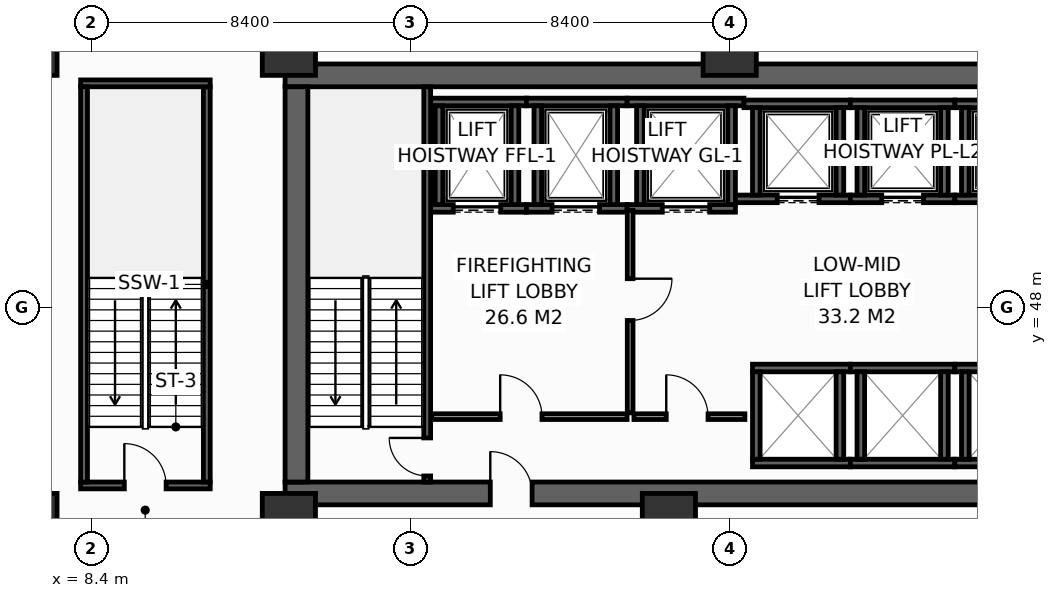
"""IFC4 building model, lengths in metres.
Left out: names, types, materials, properties, quantities, classifications, styles, units other than length and angle.
Written with IfcOpenShell. Run it as: python <this file> out.ifc"""

import sys

from ifc_helpers import new_model, si_unit, direction, frame, frame_2d, origin, origin_2d, place, context, subcontext, project, spatial, rectangle, hollow_rectangle, extrude, element, fill, save


model = new_model("IFC4")
c1 = context("Model", 3, precision=1e-05, world=origin(), true_north=direction((0.0, 1.0)))
c2 = subcontext(c1, "Body", "Model", "MODEL_VIEW")
j1 = project(units=[si_unit("LENGTHUNIT", "METRE"), si_unit("PLANEANGLEUNIT", "RADIAN")], contexts=[c1])
p1 = place(None, origin())
s1 = spatial("IfcSite", under=j1, at=p1, CompositionType="ELEMENT")
p2 = place(p1, origin())
s2 = spatial("IfcBuilding", under=s1, at=p2, CompositionType="ELEMENT")
p3 = place(p2, frame((0.0, 0.0, 16.8)))
s3 = spatial("IfcBuildingStorey", under=s2, at=p3, CompositionType="ELEMENT", Elevation=16.8)
p4 = place(p3, frame((13.5, 43.1, 0.0), z_axis=(0.0, 0.0, 1.0), x_axis=(1.0, 0.0, 0.0)))
e1 = element("IfcWall", 1, at=p4, inside=s3, PredefinedType="SHEAR", context=c2, shape_type="SweptSolid", body=[
    extrude(rectangle(XDim=32.9, YDim=0.6, at=frame_2d((16.45, 0.0))), origin(), (0.0, 0.0, 1.0), 5.1),
])
p5 = place(p4, frame((5.4, 0.0, 0.0)))
e2 = element("IfcOpeningElement", 2, at=p5, cuts=e1, PredefinedType="OPENING", context=c2, shape_type="SweptSolid", body=[
    extrude(rectangle(XDim=1.1, YDim=2.15, at=frame_2d((0.55, 1.075))), frame((0.0, 0.31, 0.0), z_axis=(0.0, -1.0, 0.0), x_axis=(1.0, 0.0, 0.0)), (0.0, 0.0, 1.0), 0.62),
])
p6 = place(p4, frame((25.6, 0.0, 0.0)))
e3 = element("IfcOpeningElement", 3, at=p6, cuts=e1, PredefinedType="OPENING", context=c2, shape_type="SweptSolid", body=[
    extrude(rectangle(XDim=1.1, YDim=2.15, at=frame_2d((0.55, 1.075))), frame((0.0, 0.31, 0.0), z_axis=(0.0, -1.0, 0.0), x_axis=(1.0, 0.0, 0.0)), (0.0, 0.0, 1.0), 0.62),
])
p7 = place(p3, frame((13.5, 54.1, 0.0), z_axis=(0.0, 0.0, 1.0), x_axis=(1.0, 0.0, 0.0)))
e4 = element("IfcWall", 4, at=p7, inside=s3, PredefinedType="SHEAR", context=c2, shape_type="SweptSolid", body=[
    extrude(rectangle(XDim=32.9, YDim=0.6, at=frame_2d((16.45, 0.0))), origin(), (0.0, 0.0, 1.0), 5.1),
])
p8 = place(p3, frame((13.8, 43.4, 0.0), z_axis=(0.0, 0.0, 1.0), x_axis=(0.0, 1.0, 0.0)))
e5 = element("IfcWall", 5, at=p8, inside=s3, PredefinedType="SHEAR", context=c2, shape_type="SweptSolid", body=[
    extrude(rectangle(XDim=10.4, YDim=0.6, at=frame_2d((5.2, 0.0))), origin(), (0.0, 0.0, 1.0), 5.1),
])
for number, where, z_axis, x_axis in (
    (6, (6.8, 54.8, 0.0), (0.0, 0.0, 1.0), (1.0, 0.0, 0.0)),
    (7, (13.6, 54.8, 0.0), (0.0, 0.0, 1.0), (1.0, 0.0, 0.0)),
    (8, (25.2, 54.8, 0.0), (0.0, 0.0, 1.0), (1.0, 0.0, 0.0)),
    (9, (6.8, 42.4, 0.0), (0.0, 0.0, 1.0), (1.0, 0.0, 0.0)),
    (10, (13.6, 42.4, 0.0), (0.0, 0.0, 1.0), (1.0, 0.0, 0.0)),
    (11, (23.6, 42.4, 0.0), (0.0, 0.0, 1.0), (1.0, 0.0, 0.0)),
):
    element("IfcColumn", number, at=place(p3, frame(where, z_axis=z_axis, x_axis=x_axis)), inside=s3, PredefinedType="COLUMN", context=c2, shape_type="SweptSolid", body=[
        extrude(hollow_rectangle(XDim=1.4, YDim=1.4, WallThickness=0.065, at=origin_2d()), origin(), (0.0, 0.0, 1.0), 5.4),
    ])
p9 = place(p3, frame((17.33, 50.6, 0.0), z_axis=(0.0, 0.0, 1.0), x_axis=(1.0, 0.0, 0.0)))
e12 = element("IfcWall", 12, at=p9, inside=s3, PredefinedType="SHEAR", context=c2, shape_type="SweptSolid", body=[
    extrude(rectangle(XDim=2.52, YDim=0.2, at=frame_2d((1.26, 0.0))), origin(), (0.0, 0.0, 1.0), 5.1),
])
p10 = place(p9, frame((0.595, 0.0, 0.0)))
e13 = element("IfcOpeningElement", 13, at=p10, cuts=e12, PredefinedType="OPENING", context=c2, shape_type="SweptSolid", body=[
    extrude(rectangle(XDim=1.25, YDim=2.3, at=frame_2d((0.625, 1.15))), frame((0.0, 0.11, 0.0), z_axis=(0.0, -1.0, 0.0), x_axis=(1.0, 0.0, 0.0)), (0.0, 0.0, 1.0), 0.22),
])
p11 = place(p3, frame((17.33, 53.4, 0.0), z_axis=(0.0, 0.0, 1.0), x_axis=(1.0, 0.0, 0.0)))
e14 = element("IfcWall", 14, at=p11, inside=s3, PredefinedType="SHEAR", context=c2, shape_type="SweptSolid", body=[
    extrude(rectangle(XDim=2.52, YDim=0.2, at=frame_2d((1.26, 0.0))), origin(), (0.0, 0.0, 1.0), 5.1),
])
for number, where, z_axis, x_axis in (
    (15, (17.55, 50.7, 0.0), (0.0, 0.0, 1.0), (0.0, 1.0, 0.0)),
    (16, (19.55, 50.7, 0.0), (0.0, 0.0, 1.0), (0.0, 1.0, 0.0)),
):
    element("IfcWall", number, at=place(p3, frame(where, z_axis=z_axis, x_axis=x_axis)), inside=s3, PredefinedType="SHEAR", context=c2, shape_type="SweptSolid", body=[
        extrude(rectangle(XDim=2.6, YDim=0.2, at=frame_2d((1.3, 0.0))), origin(), (0.0, 0.0, 1.0), 5.1),
    ])
p12 = place(p3, frame((19.85, 50.6, 0.0), z_axis=(0.0, 0.0, 1.0), x_axis=(1.0, 0.0, 0.0)))
e17 = element("IfcWall", 17, at=p12, inside=s3, PredefinedType="SHEAR", context=c2, shape_type="SweptSolid", body=[
    extrude(rectangle(XDim=2.65, YDim=0.2, at=frame_2d((1.325, 0.0))), origin(), (0.0, 0.0, 1.0), 5.1),
])
p13 = place(p12, frame((0.675, 0.0, 0.0)))
e18 = element("IfcOpeningElement", 18, at=p13, cuts=e17, PredefinedType="OPENING", context=c2, shape_type="SweptSolid", body=[
    extrude(rectangle(XDim=1.25, YDim=2.3, at=frame_2d((0.625, 1.15))), frame((0.0, 0.11, 0.0), z_axis=(0.0, -1.0, 0.0), x_axis=(1.0, 0.0, 0.0)), (0.0, 0.0, 1.0), 0.22),
])
p14 = place(p3, frame((19.85, 53.4, 0.0), z_axis=(0.0, 0.0, 1.0), x_axis=(1.0, 0.0, 0.0)))
e19 = element("IfcWall", 19, at=p14, inside=s3, PredefinedType="SHEAR", context=c2, shape_type="SweptSolid", body=[
    extrude(rectangle(XDim=2.65, YDim=0.2, at=frame_2d((1.325, 0.0))), origin(), (0.0, 0.0, 1.0), 5.1),
])
for number, where, z_axis, x_axis in (
    (20, (20.15, 50.7, 0.0), (0.0, 0.0, 1.0), (0.0, 1.0, 0.0)),
    (21, (22.15, 50.7, 0.0), (0.0, 0.0, 1.0), (0.0, 1.0, 0.0)),
):
    element("IfcWall", number, at=place(p3, frame(where, z_axis=z_axis, x_axis=x_axis)), inside=s3, PredefinedType="SHEAR", context=c2, shape_type="SweptSolid", body=[
        extrude(rectangle(XDim=2.6, YDim=0.2, at=frame_2d((1.3, 0.0))), origin(), (0.0, 0.0, 1.0), 5.1),
    ])
p15 = place(p3, frame((22.5, 50.6, 0.0), z_axis=(0.0, 0.0, 1.0), x_axis=(1.0, 0.0, 0.0)))
e22 = element("IfcWall", 22, at=p15, inside=s3, PredefinedType="SHEAR", context=c2, shape_type="SweptSolid", body=[
    extrude(rectangle(XDim=2.85, YDim=0.2, at=frame_2d((1.425, 0.0))), origin(), (0.0, 0.0, 1.0), 5.1),
])
p16 = place(p15, frame((0.925, 0.0, 0.0)))
e23 = element("IfcOpeningElement", 23, at=p16, cuts=e22, PredefinedType="OPENING", context=c2, shape_type="SweptSolid", body=[
    extrude(rectangle(XDim=1.25, YDim=2.3, at=frame_2d((0.625, 1.15))), frame((0.0, 0.11, 0.0), z_axis=(0.0, -1.0, 0.0), x_axis=(1.0, 0.0, 0.0)), (0.0, 0.0, 1.0), 0.22),
])
p17 = place(p3, frame((22.5, 53.4, 0.0), z_axis=(0.0, 0.0, 1.0), x_axis=(1.0, 0.0, 0.0)))
e24 = element("IfcWall", 24, at=p17, inside=s3, PredefinedType="SHEAR", context=c2, shape_type="SweptSolid", body=[
    extrude(rectangle(XDim=3.075, YDim=0.2, at=frame_2d((1.538, 0.0))), origin(), (0.0, 0.0, 1.0), 5.1),
])
for number, where, z_axis, x_axis in (
    (25, (22.85, 50.7, 0.0), (0.0, 0.0, 1.0), (0.0, 1.0, 0.0)),
    (26, (25.25, 50.7, 0.0), (0.0, 0.0, 1.0), (0.0, 1.0, 0.0)),
):
    element("IfcWall", number, at=place(p3, frame(where, z_axis=z_axis, x_axis=x_axis)), inside=s3, PredefinedType="SHEAR", context=c2, shape_type="SweptSolid", body=[
        extrude(rectangle(XDim=2.6, YDim=0.2, at=frame_2d((1.3, 0.0))), origin(), (0.0, 0.0, 1.0), 5.1),
    ])
p18 = place(p3, frame((25.35, 50.85, 0.0), z_axis=(0.0, 0.0, 1.0), x_axis=(1.0, 0.0, 0.0)))
e27 = element("IfcWall", 27, at=p18, inside=s3, PredefinedType="SHEAR", context=c2, shape_type="SweptSolid", body=[
    extrude(rectangle(XDim=3.025, YDim=0.2, at=frame_2d((1.512, 0.0))), origin(), (0.0, 0.0, 1.0), 5.1),
])
p19 = place(p18, frame((1.1, 0.0, 0.0)))
e28 = element("IfcOpeningElement", 28, at=p19, cuts=e27, PredefinedType="OPENING", context=c2, shape_type="SweptSolid", body=[
    extrude(rectangle(XDim=1.1, YDim=2.2, at=frame_2d((0.55, 1.1))), frame((0.0, 0.11, 0.0), z_axis=(0.0, -1.0, 0.0), x_axis=(1.0, 0.0, 0.0)), (0.0, 0.0, 1.0), 0.22),
])
p20 = place(p3, frame((25.575, 53.35, 0.0), z_axis=(0.0, 0.0, 1.0), x_axis=(1.0, 0.0, 0.0)))
e29 = element("IfcWall", 29, at=p20, inside=s3, PredefinedType="SHEAR", context=c2, shape_type="SweptSolid", body=[
    extrude(rectangle(XDim=2.8, YDim=0.2, at=frame_2d((1.4, 0.0))), origin(), (0.0, 0.0, 1.0), 5.1),
])
for number, where, z_axis, x_axis in (
    (30, (25.9, 50.95, 0.0), (0.0, 0.0, 1.0), (0.0, 1.0, 0.0)),
    (31, (28.1, 50.95, 0.0), (0.0, 0.0, 1.0), (0.0, 1.0, 0.0)),
):
    element("IfcWall", number, at=place(p3, frame(where, z_axis=z_axis, x_axis=x_axis)), inside=s3, PredefinedType="SHEAR", context=c2, shape_type="SweptSolid", body=[
        extrude(rectangle(XDim=2.3, YDim=0.2, at=frame_2d((1.15, 0.0))), origin(), (0.0, 0.0, 1.0), 5.1),
    ])
p21 = place(p3, frame((28.375, 50.85, 0.0), z_axis=(0.0, 0.0, 1.0), x_axis=(1.0, 0.0, 0.0)))
e32 = element("IfcWall", 32, at=p21, inside=s3, PredefinedType="SHEAR", context=c2, shape_type="SweptSolid", body=[
    extrude(rectangle(XDim=2.75, YDim=0.2, at=frame_2d((1.375, 0.0))), origin(), (0.0, 0.0, 1.0), 5.1),
])
p22 = place(p21, frame((0.825, 0.0, 0.0)))
e33 = element("IfcOpeningElement", 33, at=p22, cuts=e32, PredefinedType="OPENING", context=c2, shape_type="SweptSolid", body=[
    extrude(rectangle(XDim=1.1, YDim=2.2, at=frame_2d((0.55, 1.1))), frame((0.0, 0.11, 0.0), z_axis=(0.0, -1.0, 0.0), x_axis=(1.0, 0.0, 0.0)), (0.0, 0.0, 1.0), 0.22),
])
p23 = place(p3, frame((28.375, 53.35, 0.0), z_axis=(0.0, 0.0, 1.0), x_axis=(1.0, 0.0, 0.0)))
e34 = element("IfcWall", 34, at=p23, inside=s3, PredefinedType="SHEAR", context=c2, shape_type="SweptSolid", body=[
    extrude(rectangle(XDim=2.75, YDim=0.2, at=frame_2d((1.375, 0.0))), origin(), (0.0, 0.0, 1.0), 5.1),
])
for number, where, z_axis, x_axis in (
    (35, (28.65, 50.95, 0.0), (0.0, 0.0, 1.0), (0.0, 1.0, 0.0)),
    (36, (30.85, 50.95, 0.0), (0.0, 0.0, 1.0), (0.0, 1.0, 0.0)),
):
    element("IfcWall", number, at=place(p3, frame(where, z_axis=z_axis, x_axis=x_axis)), inside=s3, PredefinedType="SHEAR", context=c2, shape_type="SweptSolid", body=[
        extrude(rectangle(XDim=2.3, YDim=0.2, at=frame_2d((1.15, 0.0))), origin(), (0.0, 0.0, 1.0), 5.1),
    ])
p24 = place(p3, frame((31.125, 50.85, 0.0), z_axis=(0.0, 0.0, 1.0), x_axis=(1.0, 0.0, 0.0)))
e37 = element("IfcWall", 37, at=p24, inside=s3, PredefinedType="SHEAR", context=c2, shape_type="SweptSolid", body=[
    extrude(rectangle(XDim=2.825, YDim=0.2, at=frame_2d((1.413, 0.0))), origin(), (0.0, 0.0, 1.0), 5.1),
])
p25 = place(p24, frame((0.825, 0.0, 0.0)))
e38 = element("IfcOpeningElement", 38, at=p25, cuts=e37, PredefinedType="OPENING", context=c2, shape_type="SweptSolid", body=[
    extrude(rectangle(XDim=1.1, YDim=2.2, at=frame_2d((0.55, 1.1))), frame((0.0, 0.11, 0.0), z_axis=(0.0, -1.0, 0.0), x_axis=(1.0, 0.0, 0.0)), (0.0, 0.0, 1.0), 0.22),
])
p26 = place(p3, frame((31.125, 53.35, 0.0), z_axis=(0.0, 0.0, 1.0), x_axis=(1.0, 0.0, 0.0)))
e39 = element("IfcWall", 39, at=p26, inside=s3, PredefinedType="SHEAR", context=c2, shape_type="SweptSolid", body=[
    extrude(rectangle(XDim=2.825, YDim=0.2, at=frame_2d((1.413, 0.0))), origin(), (0.0, 0.0, 1.0), 5.1),
])
p27 = place(p3, frame((31.4, 50.95, 0.0), z_axis=(0.0, 0.0, 1.0), x_axis=(0.0, 1.0, 0.0)))
e40 = element("IfcWall", 40, at=p27, inside=s3, PredefinedType="SHEAR", context=c2, shape_type="SweptSolid", body=[
    extrude(rectangle(XDim=2.3, YDim=0.2, at=frame_2d((1.15, 0.0))), origin(), (0.0, 0.0, 1.0), 5.1),
])
for number, where, z_axis, x_axis in (
    (41, (25.8, 43.9, 0.0), (0.0, 0.0, 1.0), (1.0, 0.0, 0.0)),
    (42, (25.8, 46.4, 0.0), (0.0, 0.0, 1.0), (1.0, 0.0, 0.0)),
):
    element("IfcWall", number, at=place(p3, frame(where, z_axis=z_axis, x_axis=x_axis)), inside=s3, PredefinedType="SHEAR", context=c2, shape_type="SweptSolid", body=[
        extrude(rectangle(XDim=2.575, YDim=0.2, at=frame_2d((1.288, 0.0))), origin(), (0.0, 0.0, 1.0), 5.1),
    ])
for number, where, z_axis, x_axis in (
    (43, (25.9, 44.0, 0.0), (0.0, 0.0, 1.0), (0.0, 1.0, 0.0)),
    (44, (28.1, 44.0, 0.0), (0.0, 0.0, 1.0), (0.0, 1.0, 0.0)),
):
    element("IfcWall", number, at=place(p3, frame(where, z_axis=z_axis, x_axis=x_axis)), inside=s3, PredefinedType="SHEAR", context=c2, shape_type="SweptSolid", body=[
        extrude(rectangle(XDim=2.3, YDim=0.2, at=frame_2d((1.15, 0.0))), origin(), (0.0, 0.0, 1.0), 5.1),
    ])
for number, where, z_axis, x_axis in (
    (45, (28.375, 43.9, 0.0), (0.0, 0.0, 1.0), (1.0, 0.0, 0.0)),
    (46, (28.375, 46.4, 0.0), (0.0, 0.0, 1.0), (1.0, 0.0, 0.0)),
):
    element("IfcWall", number, at=place(p3, frame(where, z_axis=z_axis, x_axis=x_axis)), inside=s3, PredefinedType="SHEAR", context=c2, shape_type="SweptSolid", body=[
        extrude(rectangle(XDim=2.75, YDim=0.2, at=frame_2d((1.375, 0.0))), origin(), (0.0, 0.0, 1.0), 5.1),
    ])
for number, where, z_axis, x_axis in (
    (47, (28.65, 44.0, 0.0), (0.0, 0.0, 1.0), (0.0, 1.0, 0.0)),
    (48, (30.85, 44.0, 0.0), (0.0, 0.0, 1.0), (0.0, 1.0, 0.0)),
):
    element("IfcWall", number, at=place(p3, frame(where, z_axis=z_axis, x_axis=x_axis)), inside=s3, PredefinedType="SHEAR", context=c2, shape_type="SweptSolid", body=[
        extrude(rectangle(XDim=2.3, YDim=0.2, at=frame_2d((1.15, 0.0))), origin(), (0.0, 0.0, 1.0), 5.1),
    ])
for number, where, z_axis, x_axis in (
    (49, (31.125, 43.9, 0.0), (0.0, 0.0, 1.0), (1.0, 0.0, 0.0)),
    (50, (31.125, 46.4, 0.0), (0.0, 0.0, 1.0), (1.0, 0.0, 0.0)),
):
    element("IfcWall", number, at=place(p3, frame(where, z_axis=z_axis, x_axis=x_axis)), inside=s3, PredefinedType="SHEAR", context=c2, shape_type="SweptSolid", body=[
        extrude(rectangle(XDim=2.575, YDim=0.2, at=frame_2d((1.288, 0.0))), origin(), (0.0, 0.0, 1.0), 5.1),
    ])
p28 = place(p3, frame((31.4, 44.0, 0.0), z_axis=(0.0, 0.0, 1.0), x_axis=(0.0, 1.0, 0.0)))
e51 = element("IfcWall", 51, at=p28, inside=s3, PredefinedType="SHEAR", context=c2, shape_type="SweptSolid", body=[
    extrude(rectangle(XDim=2.3, YDim=0.2, at=frame_2d((1.15, 0.0))), origin(), (0.0, 0.0, 1.0), 5.1),
])
p29 = place(p3, frame((17.24, 43.4, 0.0), z_axis=(0.0, 0.0, 1.0), x_axis=(0.0, 1.0, 0.0)))
e52 = element("IfcWall", 52, at=p29, inside=s3, PredefinedType="SHEAR", context=c2, shape_type="SweptSolid", body=[
    extrude(rectangle(XDim=10.4, YDim=0.18, at=frame_2d((5.2, 0.0))), origin(), (0.0, 0.0, 1.0), 5.1),
])
p30 = place(p29, frame((0.16, 0.0, 0.0)))
e53 = element("IfcOpeningElement", 53, at=p30, cuts=e52, PredefinedType="OPENING", context=c2, shape_type="SweptSolid", body=[
    extrude(rectangle(XDim=1.0, YDim=2.15, at=frame_2d((0.5, 1.075))), frame((0.0, 0.1, 0.0), z_axis=(0.0, -1.0, 0.0), x_axis=(1.0, 0.0, 0.0)), (0.0, 0.0, 1.0), 0.2),
])
p31 = place(p3, frame((8.12, 43.31, 0.0), z_axis=(0.0, 0.0, 1.0), x_axis=(1.0, 0.0, 0.0)))
e54 = element("IfcWall", 54, at=p31, inside=s3, PredefinedType="SHEAR", context=c2, shape_type="SweptSolid", body=[
    extrude(rectangle(XDim=3.41, YDim=0.18, at=frame_2d((1.705, 0.0))), origin(), (0.0, 0.0, 1.0), 5.1),
])
p32 = place(p31, frame((1.15, 0.0, 0.0)))
e55 = element("IfcOpeningElement", 55, at=p32, cuts=e54, PredefinedType="OPENING", context=c2, shape_type="SweptSolid", body=[
    extrude(rectangle(XDim=1.1, YDim=2.15, at=frame_2d((0.55, 1.075))), frame((0.0, 0.1, 0.0), z_axis=(0.0, -1.0, 0.0), x_axis=(1.0, 0.0, 0.0)), (0.0, 0.0, 1.0), 0.2),
])
p33 = place(p3, frame((11.44, 43.4, 0.0), z_axis=(0.0, 0.0, 1.0), x_axis=(0.0, 1.0, 0.0)))
e56 = element("IfcWall", 56, at=p33, inside=s3, PredefinedType="SHEAR", context=c2, shape_type="SweptSolid", body=[
    extrude(rectangle(XDim=10.4, YDim=0.18, at=frame_2d((5.2, 0.0))), origin(), (0.0, 0.0, 1.0), 5.1),
])
p34 = place(p3, frame((11.53, 53.89, 0.0), z_axis=(0.0, 0.0, 1.0), x_axis=(-1.0, 0.0, 0.0)))
e57 = element("IfcWall", 57, at=p34, inside=s3, PredefinedType="SHEAR", context=c2, shape_type="SweptSolid", body=[
    extrude(rectangle(XDim=3.41, YDim=0.18, at=frame_2d((1.705, 0.0))), origin(), (0.0, 0.0, 1.0), 5.1),
])
p35 = place(p3, frame((8.21, 53.8, 0.0), z_axis=(0.0, 0.0, 1.0), x_axis=(0.0, -1.0, 0.0)))
e58 = element("IfcWall", 58, at=p35, inside=s3, PredefinedType="SHEAR", context=c2, shape_type="SweptSolid", body=[
    extrude(rectangle(XDim=10.4, YDim=0.18, at=frame_2d((5.2, 0.0))), origin(), (0.0, 0.0, 1.0), 5.1),
])
p36 = place(p3, frame((17.36, 45.12, 0.0), z_axis=(0.0, 0.0, 1.0), x_axis=(1.0, 0.0, 0.0)))
e59 = element("IfcWall", 59, at=p36, inside=s3, PredefinedType="PARTITIONING", context=c2, shape_type="SweptSolid", body=[
    extrude(rectangle(XDim=5.14, YDim=0.15, at=frame_2d((2.57, 0.0))), origin(), (0.0, 0.0, 1.0), 5.1),
])
p37 = place(p36, frame((1.8, 0.0, 0.0)))
e60 = element("IfcOpeningElement", 60, at=p37, cuts=e59, PredefinedType="OPENING", context=c2, shape_type="SweptSolid", body=[
    extrude(rectangle(XDim=1.1, YDim=2.15, at=frame_2d((0.55, 1.075))), frame((0.0, 0.085, 0.0), z_axis=(0.0, -1.0, 0.0), x_axis=(1.0, 0.0, 0.0)), (0.0, 0.0, 1.0), 0.17),
])
p38 = place(p3, frame((22.58, 50.55, 0.0), z_axis=(0.0, 0.0, 1.0), x_axis=(0.0, -1.0, 0.0)))
e61 = element("IfcWall", 61, at=p38, inside=s3, PredefinedType="PARTITIONING", context=c2, shape_type="SweptSolid", body=[
    extrude(rectangle(XDim=5.33, YDim=0.15, at=frame_2d((2.665, 0.0))), origin(), (0.0, 0.0, 1.0), 5.1),
])
p39 = place(p38, frame((1.8, 0.0, 0.0)))
e62 = element("IfcOpeningElement", 62, at=p39, cuts=e61, PredefinedType="OPENING", context=c2, shape_type="SweptSolid", body=[
    extrude(rectangle(XDim=1.1, YDim=2.15, at=frame_2d((0.55, 1.075))), frame((0.0, 0.085, 0.0), z_axis=(0.0, -1.0, 0.0), x_axis=(1.0, 0.0, 0.0)), (0.0, 0.0, 1.0), 0.17),
])
p40 = place(p3, frame((22.68, 45.12, 0.0), z_axis=(0.0, 0.0, 1.0), x_axis=(1.0, 0.0, 0.0)))
e63 = element("IfcWall", 63, at=p40, inside=s3, PredefinedType="PARTITIONING", context=c2, shape_type="SweptSolid", body=[
    extrude(rectangle(XDim=2.92, YDim=0.15, at=frame_2d((1.46, 0.0))), origin(), (0.0, 0.0, 1.0), 5.1),
])
p41 = place(p40, frame((0.85, 0.0, 0.0)))
e64 = element("IfcOpeningElement", 64, at=p41, cuts=e63, PredefinedType="OPENING", context=c2, shape_type="SweptSolid", body=[
    extrude(rectangle(XDim=1.1, YDim=2.15, at=frame_2d((0.55, 1.075))), frame((0.0, 0.085, 0.0), z_axis=(0.0, -1.0, 0.0), x_axis=(1.0, 0.0, 0.0)), (0.0, 0.0, 1.0), 0.17),
])
p42 = place(p10, origin())
e65 = element("IfcDoor", 65, at=p42, inside=s3, OperationType="SLIDING_TO_LEFT", PredefinedType="DOOR", context=c2, shape_type="SweptSolid", body=[
    extrude(rectangle(XDim=1.25, YDim=2.3, at=frame_2d((0.625, 1.15))), frame((0.0, 0.025, 0.0), z_axis=(0.0, -1.0, 0.0), x_axis=(1.0, 0.0, 0.0)), (0.0, 0.0, 1.0), 0.05),
])
fill(e13, e65)
p43 = place(p13, origin())
e66 = element("IfcDoor", 66, at=p43, inside=s3, OperationType="SLIDING_TO_LEFT", PredefinedType="DOOR", context=c2, shape_type="SweptSolid", body=[
    extrude(rectangle(XDim=1.25, YDim=2.3, at=frame_2d((0.625, 1.15))), frame((0.0, 0.025, 0.0), z_axis=(0.0, -1.0, 0.0), x_axis=(1.0, 0.0, 0.0)), (0.0, 0.0, 1.0), 0.05),
])
fill(e18, e66)
p44 = place(p16, origin())
e67 = element("IfcDoor", 67, at=p44, inside=s3, OperationType="SLIDING_TO_LEFT", PredefinedType="DOOR", context=c2, shape_type="SweptSolid", body=[
    extrude(rectangle(XDim=1.25, YDim=2.3, at=frame_2d((0.625, 1.15))), frame((0.0, 0.025, 0.0), z_axis=(0.0, -1.0, 0.0), x_axis=(1.0, 0.0, 0.0)), (0.0, 0.0, 1.0), 0.05),
])
fill(e23, e67)
p45 = place(p19, origin())
e68 = element("IfcDoor", 68, at=p45, inside=s3, OperationType="SLIDING_TO_LEFT", PredefinedType="DOOR", context=c2, shape_type="SweptSolid", body=[
    extrude(rectangle(XDim=1.1, YDim=2.2, at=frame_2d((0.55, 1.1))), frame((0.0, 0.025, 0.0), z_axis=(0.0, -1.0, 0.0), x_axis=(1.0, 0.0, 0.0)), (0.0, 0.0, 1.0), 0.05),
])
fill(e28, e68)
p46 = place(p22, origin())
e69 = element("IfcDoor", 69, at=p46, inside=s3, OperationType="SLIDING_TO_LEFT", PredefinedType="DOOR", context=c2, shape_type="SweptSolid", body=[
    extrude(rectangle(XDim=1.1, YDim=2.2, at=frame_2d((0.55, 1.1))), frame((0.0, 0.025, 0.0), z_axis=(0.0, -1.0, 0.0), x_axis=(1.0, 0.0, 0.0)), (0.0, 0.0, 1.0), 0.05),
])
fill(e33, e69)
p47 = place(p30, origin())
e70 = element("IfcDoor", 70, at=p47, inside=s3, OperationType="SINGLE_SWING_RIGHT", PredefinedType="DOOR", context=c2, shape_type="SweptSolid", body=[
    extrude(rectangle(XDim=1.0, YDim=2.15, at=frame_2d((0.5, 1.075))), frame((0.0, 0.025, 0.0), z_axis=(0.0, -1.0, 0.0), x_axis=(1.0, 0.0, 0.0)), (0.0, 0.0, 1.0), 0.05),
])
fill(e53, e70)
p48 = place(p32, origin())
e71 = element("IfcDoor", 71, at=p48, inside=s3, OperationType="SINGLE_SWING_LEFT", PredefinedType="DOOR", context=c2, shape_type="SweptSolid", body=[
    extrude(rectangle(XDim=1.1, YDim=2.15, at=frame_2d((0.55, 1.075))), frame((0.0, 0.025, 0.0), z_axis=(0.0, -1.0, 0.0), x_axis=(1.0, 0.0, 0.0)), (0.0, 0.0, 1.0), 0.05),
])
fill(e55, e71)
p49 = place(p37, origin())
e72 = element("IfcDoor", 72, at=p49, inside=s3, OperationType="SINGLE_SWING_LEFT", PredefinedType="DOOR", context=c2, shape_type="SweptSolid", body=[
    extrude(rectangle(XDim=1.1, YDim=2.15, at=frame_2d((0.55, 1.075))), frame((0.0, 0.025, 0.0), z_axis=(0.0, -1.0, 0.0), x_axis=(1.0, 0.0, 0.0)), (0.0, 0.0, 1.0), 0.05),
])
fill(e60, e72)
p50 = place(p39, origin())
e73 = element("IfcDoor", 73, at=p50, inside=s3, OperationType="SINGLE_SWING_LEFT", PredefinedType="DOOR", context=c2, shape_type="SweptSolid", body=[
    extrude(rectangle(XDim=1.1, YDim=2.15, at=frame_2d((0.55, 1.075))), frame((0.0, 0.025, 0.0), z_axis=(0.0, -1.0, 0.0), x_axis=(1.0, 0.0, 0.0)), (0.0, 0.0, 1.0), 0.05),
])
fill(e62, e73)
p51 = place(p41, origin())
e74 = element("IfcDoor", 74, at=p51, inside=s3, OperationType="SINGLE_SWING_LEFT", PredefinedType="DOOR", context=c2, shape_type="SweptSolid", body=[
    extrude(rectangle(XDim=1.1, YDim=2.15, at=frame_2d((0.55, 1.075))), frame((0.0, 0.025, 0.0), z_axis=(0.0, -1.0, 0.0), x_axis=(1.0, 0.0, 0.0)), (0.0, 0.0, 1.0), 0.05),
])
fill(e64, e74)
p52 = place(p5, origin())
e75 = element("IfcDoor", 75, at=p52, inside=s3, OperationType="SINGLE_SWING_LEFT", PredefinedType="DOOR", context=c2, shape_type="SweptSolid", body=[
    extrude(rectangle(XDim=1.1, YDim=2.15, at=frame_2d((0.55, 1.075))), frame((0.0, 0.025, 0.0), z_axis=(0.0, -1.0, 0.0), x_axis=(1.0, 0.0, 0.0)), (0.0, 0.0, 1.0), 0.05),
])
fill(e2, e75)
save(model, sys.argv[1])
